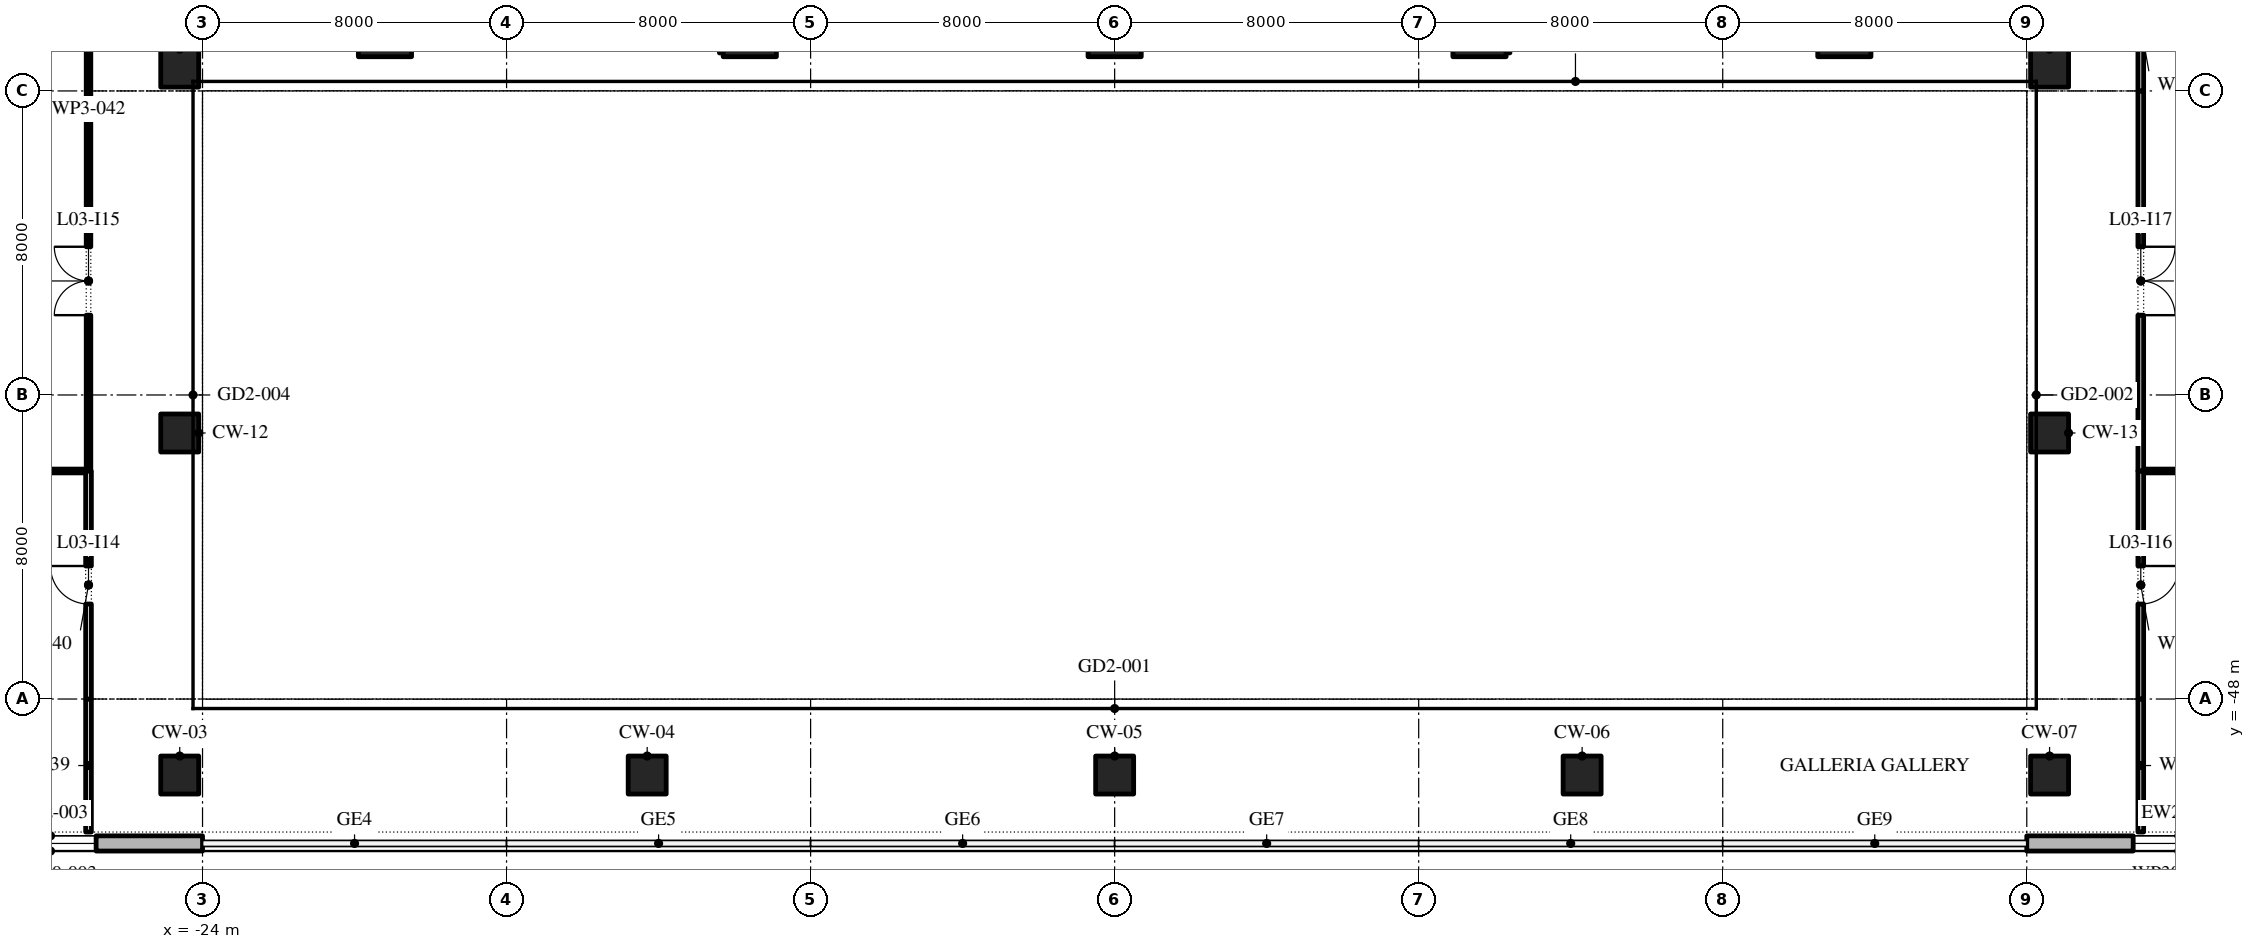
"""IFC4 building model, lengths in metres.
Left out: names, types, materials, properties, quantities, classifications, styles, units other than length and angle.
Written with IfcOpenShell. Run it as: python <this file> out.ifc"""

import sys

from ifc_helpers import new_model, si_unit, direction, frame, frame_2d, origin, origin_2d, place, context, subcontext, project, spatial, polyline, rectangle, outline, extrude, element, fill, save


model = new_model("IFC4")
c1 = context("Model", 3, precision=1e-05, world=origin(), true_north=direction((0.0, 1.0)))
c2 = subcontext(c1, "Body", "Model", "MODEL_VIEW")
j1 = project(units=[si_unit("LENGTHUNIT", "METRE"), si_unit("PLANEANGLEUNIT", "RADIAN")], contexts=[c1])
p1 = place(None, origin())
s1 = spatial("IfcSite", under=j1, at=p1, CompositionType="ELEMENT")
p2 = place(p1, origin())
s2 = spatial("IfcBuilding", under=s1, at=p2, CompositionType="ELEMENT")
p3 = place(p2, frame((0.0, 0.0, 19.2)))
s3 = spatial("IfcBuildingStorey", under=s2, at=p3, CompositionType="ELEMENT", Elevation=19.2)
for number, where, z_axis, x_axis in (
    (1, (-24.6, -50.0, 0.0), (0.0, 0.0, 1.0), (1.0, 0.0, 0.0)),
    (2, (-12.3, -50.0, 0.0), (0.0, 0.0, 1.0), (1.0, 0.0, 0.0)),
    (3, (0.0, -50.0, 0.0), (0.0, 0.0, 1.0), (1.0, 0.0, 0.0)),
    (4, (12.3, -50.0, 0.0), (0.0, 0.0, 1.0), (1.0, 0.0, 0.0)),
    (5, (24.6, -50.0, 0.0), (0.0, 0.0, 1.0), (1.0, 0.0, 0.0)),
    (6, (-24.6, -41.0, 0.0), (0.0, 0.0, 1.0), (1.0, 0.0, 0.0)),
    (7, (24.6, -41.0, 0.0), (0.0, 0.0, 1.0), (1.0, 0.0, 0.0)),
    (8, (-24.6, -31.4, 0.0), (0.0, 0.0, 1.0), (1.0, 0.0, 0.0)),
    (9, (24.6, -31.4, 0.0), (0.0, 0.0, 1.0), (1.0, 0.0, 0.0)),
):
    element("IfcColumn", number, at=place(p3, frame(where, z_axis=z_axis, x_axis=x_axis)), inside=s3, PredefinedType="COLUMN", context=c2, shape_type="SweptSolid", body=[
        extrude(rectangle(XDim=1.0, YDim=1.0, at=origin_2d()), origin(), (0.0, 0.0, 1.0), 4.8),
    ])
for number, where, z_axis, x_axis in (
    (10, (-19.2, -30.4, 0.0), (0.0, 0.0, 1.0), (1.0, 0.0, 0.0)),
    (11, (-9.6, -30.4, 0.0), (0.0, 0.0, 1.0), (1.0, 0.0, 0.0)),
    (12, (0.0, -30.4, 0.0), (0.0, 0.0, 1.0), (1.0, 0.0, 0.0)),
    (13, (9.6, -30.4, 0.0), (0.0, 0.0, 1.0), (1.0, 0.0, 0.0)),
    (14, (19.2, -30.4, 0.0), (0.0, 0.0, 1.0), (1.0, 0.0, 0.0)),
):
    element("IfcColumn", number, at=place(p3, frame(where, z_axis=z_axis, x_axis=x_axis)), inside=s3, PredefinedType="COLUMN", context=c2, shape_type="SweptSolid", body=[
        extrude(rectangle(XDim=1.4, YDim=1.4, at=origin_2d()), origin(), (0.0, 0.0, 1.0), 4.8),
    ])
p4 = place(p3, frame((-32.0, -51.8, 0.0), z_axis=(0.0, 0.0, 1.0), x_axis=(1.0, 0.0, 0.0)))
e15 = element("IfcWall", 15, at=p4, inside=s3, PredefinedType="STANDARD", context=c2, shape_type="SweptSolid", body=[
    extrude(rectangle(XDim=8.0, YDim=0.4, at=frame_2d((4.0, 0.0))), origin(), (0.0, 0.0, 1.0), 4.5),
])
p5 = place(p4, frame((2.8, 0.0, 0.9)))
e16 = element("IfcOpeningElement", 16, at=p5, cuts=e15, PredefinedType="OPENING", context=c2, shape_type="SweptSolid", body=[
    extrude(outline(polyline([(0.0, 0.0), (2.4, 0.0), (2.4, 1.5), (2.378, 1.758), (2.313, 2.009), (2.207, 2.245), (2.063, 2.46), (1.885, 2.648), (1.677, 2.804), (1.447, 2.922), (1.2, 3.0), (0.953, 2.922), (0.722, 2.804), (0.515, 2.648), (0.337, 2.46), (0.193, 2.245), (0.087, 2.009), (0.022, 1.758), (0.0, 1.5), (0.0, 0.0)])), frame((0.0, 0.21, 0.0), z_axis=(0.0, -1.0, 0.0), x_axis=(1.0, 0.0, 0.0)), (0.0, 0.0, 1.0), 0.42),
])
p6 = place(p3, frame((24.0, -51.8, 0.0), z_axis=(0.0, 0.0, 1.0), x_axis=(1.0, 0.0, 0.0)))
e17 = element("IfcWall", 17, at=p6, inside=s3, PredefinedType="STANDARD", context=c2, shape_type="SweptSolid", body=[
    extrude(rectangle(XDim=8.0, YDim=0.4, at=frame_2d((4.0, 0.0))), origin(), (0.0, 0.0, 1.0), 4.5),
])
p7 = place(p6, frame((2.8, 0.0, 0.9)))
e18 = element("IfcOpeningElement", 18, at=p7, cuts=e17, PredefinedType="OPENING", context=c2, shape_type="SweptSolid", body=[
    extrude(outline(polyline([(0.0, 0.0), (2.4, 0.0), (2.4, 1.5), (2.378, 1.758), (2.313, 2.009), (2.207, 2.245), (2.063, 2.46), (1.885, 2.648), (1.677, 2.804), (1.447, 2.922), (1.2, 3.0), (0.953, 2.922), (0.722, 2.804), (0.515, 2.648), (0.337, 2.46), (0.193, 2.245), (0.087, 2.009), (0.022, 1.758), (0.0, 1.5), (0.0, 0.0)])), frame((0.0, 0.21, 0.0), z_axis=(0.0, -1.0, 0.0), x_axis=(1.0, 0.0, 0.0)), (0.0, 0.0, 1.0), 0.42),
])
for number, where, z_axis, x_axis in (
    (19, (-35.0, -42.0, 0.0), (0.0, 0.0, 1.0), (1.0, 0.0, 0.0)),
    (20, (27.075, -42.0, 0.0), (0.0, 0.0, 1.0), (1.0, 0.0, 0.0)),
):
    element("IfcWall", number, at=place(p3, frame(where, z_axis=z_axis, x_axis=x_axis)), inside=s3, PredefinedType="PARTITIONING", context=c2, shape_type="SweptSolid", body=[
        extrude(rectangle(XDim=7.925, YDim=0.1, at=frame_2d((3.962, 0.0))), origin(), (0.0, 0.0, 1.0), 4.5),
    ])
p8 = place(p3, frame((-27.0, -51.5, 0.0), z_axis=(0.0, 0.0, 1.0), x_axis=(0.0, 1.0, 0.0)))
e21 = element("IfcWall", 21, at=p8, inside=s3, PredefinedType="PARTITIONING", context=c2, shape_type="SweptSolid", body=[
    extrude(rectangle(XDim=3.5, YDim=0.15, at=frame_2d((1.75, 0.0))), origin(), (0.0, 0.0, 1.0), 4.5),
])
p9 = place(p3, frame((-27.0, -48.0, 0.0), z_axis=(0.0, 0.0, 1.0), x_axis=(0.0, 1.0, 0.0)))
e22 = element("IfcWall", 22, at=p9, inside=s3, PredefinedType="PARTITIONING", context=c2, shape_type="SweptSolid", body=[
    extrude(rectangle(XDim=6.0, YDim=0.15, at=frame_2d((3.0, 0.0))), origin(), (0.0, 0.0, 1.0), 4.5),
])
p10 = place(p9, frame((2.5, 0.0, 0.0)))
e23 = element("IfcOpeningElement", 23, at=p10, cuts=e22, PredefinedType="OPENING", context=c2, shape_type="SweptSolid", body=[
    extrude(rectangle(XDim=1.0, YDim=2.1, at=frame_2d((0.5, 1.05))), frame((0.0, 0.085, 0.0), z_axis=(0.0, -1.0, 0.0), x_axis=(1.0, 0.0, 0.0)), (0.0, 0.0, 1.0), 0.17),
])
p11 = place(p3, frame((-27.0, -42.0, 0.0), z_axis=(0.0, 0.0, 1.0), x_axis=(0.0, 1.0, 0.0)))
e24 = element("IfcWall", 24, at=p11, inside=s3, PredefinedType="PARTITIONING", context=c2, shape_type="SweptSolid", body=[
    extrude(rectangle(XDim=10.0, YDim=0.12, at=frame_2d((5.0, 0.0))), origin(), (0.0, 0.0, 1.0), 4.5),
])
p12 = place(p11, frame((4.1, 0.0, 0.0)))
e25 = element("IfcOpeningElement", 25, at=p12, cuts=e24, PredefinedType="OPENING", context=c2, shape_type="SweptSolid", body=[
    extrude(rectangle(XDim=1.8, YDim=2.1, at=frame_2d((0.9, 1.05))), frame((0.0, 0.07, 0.0), z_axis=(0.0, -1.0, 0.0), x_axis=(1.0, 0.0, 0.0)), (0.0, 0.0, 1.0), 0.14),
])
p13 = place(p3, frame((-27.0, -32.0, 0.0), z_axis=(0.0, 0.0, 1.0), x_axis=(0.0, 1.0, 0.0)))
e26 = element("IfcWall", 26, at=p13, inside=s3, PredefinedType="PARTITIONING", context=c2, shape_type="SweptSolid", body=[
    extrude(rectangle(XDim=3.44, YDim=0.12, at=frame_2d((1.72, 0.0))), origin(), (0.0, 0.0, 1.0), 4.5),
])
p14 = place(p3, frame((27.0, -51.5, 0.0), z_axis=(0.0, 0.0, 1.0), x_axis=(0.0, 1.0, 0.0)))
e27 = element("IfcWall", 27, at=p14, inside=s3, PredefinedType="PARTITIONING", context=c2, shape_type="SweptSolid", body=[
    extrude(rectangle(XDim=3.5, YDim=0.15, at=frame_2d((1.75, 0.0))), origin(), (0.0, 0.0, 1.0), 4.5),
])
p15 = place(p3, frame((27.0, -48.0, 0.0), z_axis=(0.0, 0.0, 1.0), x_axis=(0.0, 1.0, 0.0)))
e28 = element("IfcWall", 28, at=p15, inside=s3, PredefinedType="PARTITIONING", context=c2, shape_type="SweptSolid", body=[
    extrude(rectangle(XDim=6.0, YDim=0.15, at=frame_2d((3.0, 0.0))), origin(), (0.0, 0.0, 1.0), 4.5),
])
p16 = place(p15, frame((2.5, 0.0, 0.0)))
e29 = element("IfcOpeningElement", 29, at=p16, cuts=e28, PredefinedType="OPENING", context=c2, shape_type="SweptSolid", body=[
    extrude(rectangle(XDim=1.0, YDim=2.1, at=frame_2d((0.5, 1.05))), frame((0.0, 0.085, 0.0), z_axis=(0.0, -1.0, 0.0), x_axis=(1.0, 0.0, 0.0)), (0.0, 0.0, 1.0), 0.17),
])
p17 = place(p3, frame((27.0, -42.0, 0.0), z_axis=(0.0, 0.0, 1.0), x_axis=(0.0, 1.0, 0.0)))
e30 = element("IfcWall", 30, at=p17, inside=s3, PredefinedType="PARTITIONING", context=c2, shape_type="SweptSolid", body=[
    extrude(rectangle(XDim=10.0, YDim=0.15, at=frame_2d((5.0, 0.0))), origin(), (0.0, 0.0, 1.0), 4.5),
])
p18 = place(p17, frame((4.1, 0.0, 0.0)))
e31 = element("IfcOpeningElement", 31, at=p18, cuts=e30, PredefinedType="OPENING", context=c2, shape_type="SweptSolid", body=[
    extrude(rectangle(XDim=1.8, YDim=2.1, at=frame_2d((0.9, 1.05))), frame((0.0, 0.085, 0.0), z_axis=(0.0, -1.0, 0.0), x_axis=(1.0, 0.0, 0.0)), (0.0, 0.0, 1.0), 0.17),
])
p19 = place(p3, frame((27.0, -32.0, 0.0), z_axis=(0.0, 0.0, 1.0), x_axis=(0.0, 1.0, 0.0)))
e32 = element("IfcWall", 32, at=p19, inside=s3, PredefinedType="PARTITIONING", context=c2, shape_type="SweptSolid", body=[
    extrude(rectangle(XDim=3.425, YDim=0.15, at=frame_2d((1.712, 0.0))), origin(), (0.0, 0.0, 1.0), 4.5),
])
p20 = place(p5, origin())
e33 = element("IfcWindow", 33, at=p20, inside=s3, PartitioningType="DOUBLE_PANEL_VERTICAL", PredefinedType="WINDOW", context=c2, shape_type="SweptSolid", body=[
    extrude(outline(polyline([(0.0, 0.0), (2.4, 0.0), (2.4, 1.5), (2.378, 1.758), (2.313, 2.009), (2.207, 2.245), (2.063, 2.46), (1.885, 2.648), (1.677, 2.804), (1.447, 2.922), (1.2, 3.0), (0.953, 2.922), (0.722, 2.804), (0.515, 2.648), (0.337, 2.46), (0.193, 2.245), (0.087, 2.009), (0.022, 1.758), (0.0, 1.5), (0.0, 0.0)])), frame((0.0, 0.03, 0.0), z_axis=(0.0, -1.0, 0.0), x_axis=(1.0, 0.0, 0.0)), (0.0, 0.0, 1.0), 0.06),
])
fill(e16, e33)
p21 = place(p7, origin())
e34 = element("IfcWindow", 34, at=p21, inside=s3, PartitioningType="DOUBLE_PANEL_VERTICAL", PredefinedType="WINDOW", context=c2, shape_type="SweptSolid", body=[
    extrude(outline(polyline([(0.0, 0.0), (2.4, 0.0), (2.4, 1.5), (2.378, 1.758), (2.313, 2.009), (2.207, 2.245), (2.063, 2.46), (1.885, 2.648), (1.677, 2.804), (1.447, 2.922), (1.2, 3.0), (0.953, 2.922), (0.722, 2.804), (0.515, 2.648), (0.337, 2.46), (0.193, 2.245), (0.087, 2.009), (0.022, 1.758), (0.0, 1.5), (0.0, 0.0)])), frame((0.0, 0.03, 0.0), z_axis=(0.0, -1.0, 0.0), x_axis=(1.0, 0.0, 0.0)), (0.0, 0.0, 1.0), 0.06),
])
fill(e18, e34)
p22 = place(p10, origin())
e35 = element("IfcDoor", 35, at=p22, inside=s3, OperationType="SINGLE_SWING_LEFT", PredefinedType="DOOR", context=c2, shape_type="SweptSolid", body=[
    extrude(rectangle(XDim=1.0, YDim=2.1, at=frame_2d((0.5, 1.05))), frame((0.0, 0.025, 0.0), z_axis=(0.0, -1.0, 0.0), x_axis=(1.0, 0.0, 0.0)), (0.0, 0.0, 1.0), 0.05),
])
fill(e23, e35)
p23 = place(p12, origin())
e36 = element("IfcDoor", 36, at=p23, inside=s3, OperationType="SINGLE_SWING_LEFT", PredefinedType="DOOR", context=c2, shape_type="SweptSolid", body=[
    extrude(rectangle(XDim=1.8, YDim=2.1, at=frame_2d((0.9, 1.05))), frame((0.0, 0.025, 0.0), z_axis=(0.0, -1.0, 0.0), x_axis=(1.0, 0.0, 0.0)), (0.0, 0.0, 1.0), 0.05),
])
fill(e25, e36)
p24 = place(p16, frame((1.0, 0.0, 0.0), z_axis=(0.0, 0.0, 1.0), x_axis=(-1.0, 0.0, 0.0)))
e37 = element("IfcDoor", 37, at=p24, inside=s3, OperationType="SINGLE_SWING_RIGHT", PredefinedType="DOOR", context=c2, shape_type="SweptSolid", body=[
    extrude(rectangle(XDim=1.0, YDim=2.1, at=frame_2d((0.5, 1.05))), frame((0.0, 0.025, 0.0), z_axis=(0.0, -1.0, 0.0), x_axis=(1.0, 0.0, 0.0)), (0.0, 0.0, 1.0), 0.05),
])
fill(e29, e37)
p25 = place(p18, frame((1.8, 0.0, 0.0), z_axis=(0.0, 0.0, 1.0), x_axis=(-1.0, 0.0, 0.0)))
e38 = element("IfcDoor", 38, at=p25, inside=s3, OperationType="SINGLE_SWING_RIGHT", PredefinedType="DOOR", context=c2, shape_type="SweptSolid", body=[
    extrude(rectangle(XDim=1.8, YDim=2.1, at=frame_2d((0.9, 1.05))), frame((0.0, 0.025, 0.0), z_axis=(0.0, -1.0, 0.0), x_axis=(1.0, 0.0, 0.0)), (0.0, 0.0, 1.0), 0.05),
])
fill(e31, e38)
save(model, sys.argv[1])
